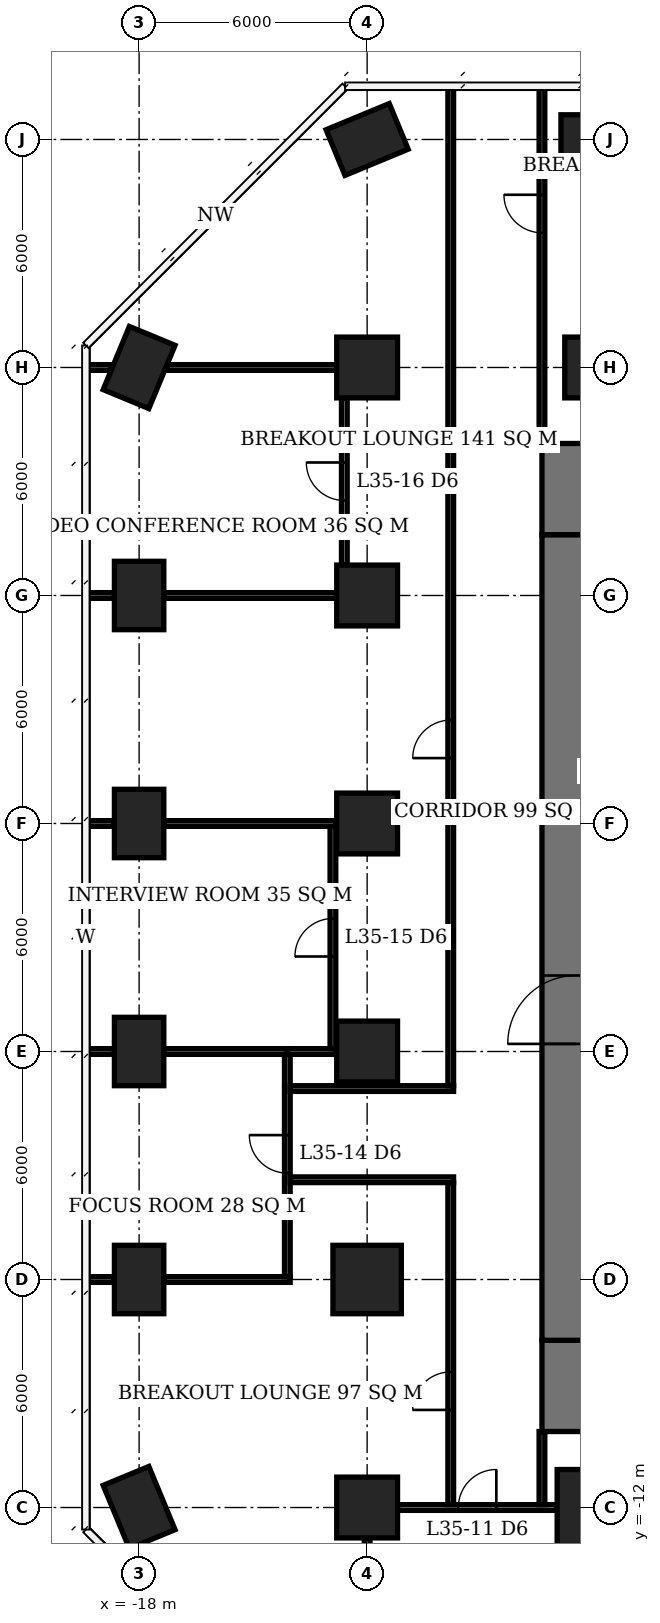
"""IFC4 building model, lengths in metres.
Left out: names, types, materials, properties, quantities, classifications, styles, units other than length and angle.
Written with IfcOpenShell. Run it as: python <this file> out.ifc"""

import sys

from ifc_helpers import new_model, si_unit, direction, frame, frame_2d, origin, origin_2d, place, context, subcontext, project, spatial, rectangle, extrude, element, fill, save


model = new_model("IFC4")
c1 = context("Model", 3, precision=1e-05, world=origin(), true_north=direction((0.0, 1.0)))
c2 = subcontext(c1, "Body", "Model", "MODEL_VIEW")
j1 = project(units=[si_unit("LENGTHUNIT", "METRE"), si_unit("PLANEANGLEUNIT", "RADIAN")], contexts=[c1])
p1 = place(None, origin())
s1 = spatial("IfcSite", under=j1, at=p1, CompositionType="ELEMENT")
p2 = place(p1, origin())
s2 = spatial("IfcBuilding", under=s1, at=p2, CompositionType="ELEMENT")
p3 = place(p2, frame((0.0, 0.0, 144.5)))
s3 = spatial("IfcBuildingStorey", under=s2, at=p3, CompositionType="ELEMENT", Elevation=144.5)
for number, where, z_axis, x_axis in (
    (1, (-18.0, -12.0, 0.0), (0.0, 0.0, 1.0), (-0.383, 0.924, 0.0)),
    (2, (-18.0, -6.0, 0.0), (0.0, 0.0, 1.0), (0.0, 1.0, 0.0)),
    (3, (-18.0, 0.0, 0.0), (0.0, 0.0, 1.0), (0.0, 1.0, 0.0)),
    (4, (-18.0, 6.0, 0.0), (0.0, 0.0, 1.0), (0.0, 1.0, 0.0)),
    (5, (-18.0, 12.0, 0.0), (0.0, 0.0, 1.0), (0.0, 1.0, 0.0)),
    (6, (-18.0, 18.0, 0.0), (0.0, 0.0, 1.0), (0.383, 0.924, 0.0)),
):
    element("IfcColumn", number, at=place(p3, frame(where, z_axis=z_axis, x_axis=x_axis)), inside=s3, PredefinedType="COLUMN", context=c2, shape_type="SweptSolid", body=[
        extrude(rectangle(XDim=1.8, YDim=1.3, at=origin_2d()), origin(), (0.0, 0.0, 1.0), 3.9),
    ])
p4 = place(p3, frame((-12.0, -12.0, 0.0), z_axis=(0.0, 0.0, 1.0), x_axis=(1.0, 0.0, 0.0)))
e7 = element("IfcColumn", 7, at=p4, inside=s3, PredefinedType="COLUMN", context=c2, shape_type="SweptSolid", body=[
    extrude(rectangle(XDim=1.6, YDim=1.6, at=origin_2d()), origin(), (0.0, 0.0, 1.0), 3.9),
])
p5 = place(p3, frame((-12.0, -6.0, 0.0), z_axis=(0.0, 0.0, 1.0), x_axis=(1.0, 0.0, 0.0)))
e8 = element("IfcColumn", 8, at=p5, inside=s3, PredefinedType="COLUMN", context=c2, shape_type="SweptSolid", body=[
    extrude(rectangle(XDim=1.8, YDim=1.8, at=origin_2d()), origin(), (0.0, 0.0, 1.0), 3.9),
])
for number, where, z_axis, x_axis in (
    (9, (-12.0, 0.0, 0.0), (0.0, 0.0, 1.0), (1.0, 0.0, 0.0)),
    (10, (-12.0, 6.0, 0.0), (0.0, 0.0, 1.0), (1.0, 0.0, 0.0)),
    (11, (-12.0, 12.0, 0.0), (0.0, 0.0, 1.0), (1.0, 0.0, 0.0)),
    (12, (-12.0, 18.0, 0.0), (0.0, 0.0, 1.0), (1.0, 0.0, 0.0)),
):
    element("IfcColumn", number, at=place(p3, frame(where, z_axis=z_axis, x_axis=x_axis)), inside=s3, PredefinedType="COLUMN", context=c2, shape_type="SweptSolid", body=[
        extrude(rectangle(XDim=1.6, YDim=1.6, at=origin_2d()), origin(), (0.0, 0.0, 1.0), 3.9),
    ])
p6 = place(p3, frame((-12.0, 24.0, 0.0), z_axis=(0.0, 0.0, 1.0), x_axis=(0.923879532511, 0.382683432365, 0.0)))
e13 = element("IfcColumn", 13, at=p6, inside=s3, PredefinedType="COLUMN", context=c2, shape_type="SweptSolid", body=[
    extrude(rectangle(XDim=1.8, YDim=1.3, at=origin_2d()), origin(), (0.0, 0.0, 1.0), 3.9),
])
p7 = place(p3, frame((-6.0, -12.0, 0.0), z_axis=(0.0, 0.0, 1.0), x_axis=(1.0, 0.0, 0.0)))
e14 = element("IfcColumn", 14, at=p7, inside=s3, PredefinedType="COLUMN", context=c2, shape_type="SweptSolid", body=[
    extrude(rectangle(XDim=2.0, YDim=2.0, at=origin_2d()), origin(), (0.0, 0.0, 1.0), 3.9),
])
p8 = place(p3, frame((-6.0, 18.0, 0.0), z_axis=(0.0, 0.0, 1.0), x_axis=(1.0, 0.0, 0.0)))
e15 = element("IfcColumn", 15, at=p8, inside=s3, PredefinedType="COLUMN", context=c2, shape_type="SweptSolid", body=[
    extrude(rectangle(XDim=1.6, YDim=1.6, at=origin_2d()), origin(), (0.0, 0.0, 1.0), 3.9),
])
p9 = place(p3, frame((-6.0, 24.0, 0.0), z_axis=(0.0, 0.0, 1.0), x_axis=(1.0, 0.0, 0.0)))
e16 = element("IfcColumn", 16, at=p9, inside=s3, PredefinedType="COLUMN", context=c2, shape_type="SweptSolid", body=[
    extrude(rectangle(XDim=1.8, YDim=1.3, at=origin_2d()), origin(), (0.0, 0.0, 1.0), 3.9),
])
p10 = place(p3, frame((-6.5, -7.6, 0.0), z_axis=(0.0, 0.0, 1.0), x_axis=(0.0, 1.0, 0.0)))
e17 = element("IfcWall", 17, at=p10, inside=s3, PredefinedType="SHEAR", context=c2, shape_type="SweptSolid", body=[
    extrude(rectangle(XDim=21.2, YDim=1.8, at=frame_2d((10.6, 0.0))), origin(), (0.0, 0.0, 1.0), 3.9),
])
p11 = place(p10, frame((7.8, 0.0, 0.0)))
e18 = element("IfcOpeningElement", 18, at=p11, cuts=e17, PredefinedType="OPENING", context=c2, shape_type="SweptSolid", body=[
    extrude(rectangle(XDim=1.8, YDim=2.4, at=frame_2d((0.9, 1.2))), frame((0.0, 0.91, 0.0), z_axis=(0.0, -1.0, 0.0), x_axis=(1.0, 0.0, 0.0)), (0.0, 0.0, 1.0), 1.82),
])
for number, where, z_axis, x_axis in (
    (19, (-6.5, -10.0, 0.0), (0.0, 0.0, 1.0), (0.0, 1.0, 0.0)),
    (20, (-6.5, 13.6, 0.0), (0.0, 0.0, 1.0), (0.0, 1.0, 0.0)),
):
    element("IfcWall", number, at=place(p3, frame(where, z_axis=z_axis, x_axis=x_axis)), inside=s3, PredefinedType="SHEAR", context=c2, shape_type="SweptSolid", body=[
        extrude(rectangle(XDim=2.4, YDim=1.8, at=frame_2d((1.2, 0.0))), origin(), (0.0, 0.0, 1.0), 3.9),
    ])
p12 = place(p3, frame((-11.2, -12.0, 0.0), z_axis=(0.0, 0.0, 1.0), x_axis=(1.0, 0.0, 0.0)))
e21 = element("IfcWall", 21, at=p12, inside=s3, PredefinedType="PARTITIONING", context=c2, shape_type="SweptSolid", body=[
    extrude(rectangle(XDim=4.2, YDim=0.15, at=frame_2d((2.1, 0.0))), origin(), (0.0, 0.0, 1.0), 3.65),
])
p13 = place(p12, frame((1.6, 0.0, 0.0)))
e22 = element("IfcOpeningElement", 22, at=p13, cuts=e21, PredefinedType="OPENING", context=c2, shape_type="SweptSolid", body=[
    extrude(rectangle(XDim=1.0, YDim=2.1, at=frame_2d((0.5, 1.05))), frame((0.0, 0.085, 0.0), z_axis=(0.0, -1.0, 0.0), x_axis=(1.0, 0.0, 0.0)), (0.0, 0.0, 1.0), 0.17),
])
p14 = place(p3, frame((-19.4, -6.0, 0.0), z_axis=(0.0, 0.0, 1.0), x_axis=(1.0, 0.0, 0.0)))
e23 = element("IfcWall", 23, at=p14, inside=s3, PredefinedType="PARTITIONING", context=c2, shape_type="SweptSolid", body=[
    extrude(rectangle(XDim=0.75, YDim=0.15, at=frame_2d((0.375, 0.0))), origin(), (0.0, 0.0, 1.0), 3.65),
])
p15 = place(p3, frame((-17.35, -6.0, 0.0), z_axis=(0.0, 0.0, 1.0), x_axis=(1.0, 0.0, 0.0)))
e24 = element("IfcWall", 24, at=p15, inside=s3, PredefinedType="PARTITIONING", context=c2, shape_type="SweptSolid", body=[
    extrude(rectangle(XDim=3.325, YDim=0.15, at=frame_2d((1.663, 0.0))), origin(), (0.0, 0.0, 1.0), 3.65),
])
p16 = place(p3, frame((-19.35, 0.0, 0.0), z_axis=(0.0, 0.0, 1.0), x_axis=(1.0, 0.0, 0.0)))
e25 = element("IfcWall", 25, at=p16, inside=s3, PredefinedType="PARTITIONING", context=c2, shape_type="SweptSolid", body=[
    extrude(rectangle(XDim=0.7, YDim=0.15, at=frame_2d((0.35, 0.0))), origin(), (0.0, 0.0, 1.0), 3.65),
])
p17 = place(p3, frame((-17.35, 0.0, 0.0), z_axis=(0.0, 0.0, 1.0), x_axis=(1.0, 0.0, 0.0)))
e26 = element("IfcWall", 26, at=p17, inside=s3, PredefinedType="PARTITIONING", context=c2, shape_type="SweptSolid", body=[
    extrude(rectangle(XDim=3.325, YDim=0.15, at=frame_2d((1.663, 0.0))), origin(), (0.0, 0.0, 1.0), 3.65),
])
p18 = place(p3, frame((-14.1, 0.0, 0.0), z_axis=(0.0, 0.0, 1.0), x_axis=(1.0, 0.0, 0.0)))
e27 = element("IfcWall", 27, at=p18, inside=s3, PredefinedType="PARTITIONING", context=c2, shape_type="SweptSolid", body=[
    extrude(rectangle(XDim=1.275, YDim=0.15, at=frame_2d((0.638, 0.0))), origin(), (0.0, 0.0, 1.0), 3.65),
])
p19 = place(p3, frame((-19.35, 6.0, 0.0), z_axis=(0.0, 0.0, 1.0), x_axis=(1.0, 0.0, 0.0)))
e28 = element("IfcWall", 28, at=p19, inside=s3, PredefinedType="PARTITIONING", context=c2, shape_type="SweptSolid", body=[
    extrude(rectangle(XDim=0.7, YDim=0.15, at=frame_2d((0.35, 0.0))), origin(), (0.0, 0.0, 1.0), 3.65),
])
p20 = place(p3, frame((-17.35, 6.0, 0.0), z_axis=(0.0, 0.0, 1.0), x_axis=(1.0, 0.0, 0.0)))
e29 = element("IfcWall", 29, at=p20, inside=s3, PredefinedType="PARTITIONING", context=c2, shape_type="SweptSolid", body=[
    extrude(rectangle(XDim=4.525, YDim=0.15, at=frame_2d((2.263, 0.0))), origin(), (0.0, 0.0, 1.0), 3.65),
])
p21 = place(p3, frame((-19.4, 12.0, 0.0), z_axis=(0.0, 0.0, 1.0), x_axis=(1.0, 0.0, 0.0)))
e30 = element("IfcWall", 30, at=p21, inside=s3, PredefinedType="PARTITIONING", context=c2, shape_type="SweptSolid", body=[
    extrude(rectangle(XDim=0.75, YDim=0.15, at=frame_2d((0.375, 0.0))), origin(), (0.0, 0.0, 1.0), 3.65),
])
p22 = place(p3, frame((-17.35, 12.0, 0.0), z_axis=(0.0, 0.0, 1.0), x_axis=(1.0, 0.0, 0.0)))
e31 = element("IfcWall", 31, at=p22, inside=s3, PredefinedType="PARTITIONING", context=c2, shape_type="SweptSolid", body=[
    extrude(rectangle(XDim=4.55, YDim=0.15, at=frame_2d((2.275, 0.0))), origin(), (0.0, 0.0, 1.0), 3.65),
])
p23 = place(p3, frame((-19.4, 18.0, 0.0), z_axis=(0.0, 0.0, 1.0), x_axis=(1.0, 0.0, 0.0)))
e32 = element("IfcWall", 32, at=p23, inside=s3, PredefinedType="PARTITIONING", context=c2, shape_type="SweptSolid", body=[
    extrude(rectangle(XDim=0.665, YDim=0.15, at=frame_2d((0.333, 0.0))), origin(), (0.0, 0.0, 1.0), 3.65),
])
p24 = place(p3, frame((-17.265, 18.0, 0.0), z_axis=(0.0, 0.0, 1.0), x_axis=(1.0, 0.0, 0.0)))
e33 = element("IfcWall", 33, at=p24, inside=s3, PredefinedType="PARTITIONING", context=c2, shape_type="SweptSolid", body=[
    extrude(rectangle(XDim=4.465, YDim=0.15, at=frame_2d((2.233, 0.0))), origin(), (0.0, 0.0, 1.0), 3.65),
])
p25 = place(p3, frame((-14.1, -5.925, 0.0), z_axis=(0.0, 0.0, 1.0), x_axis=(0.0, 1.0, 0.0)))
e34 = element("IfcWall", 34, at=p25, inside=s3, PredefinedType="PARTITIONING", context=c2, shape_type="SweptSolid", body=[
    extrude(rectangle(XDim=5.85, YDim=0.15, at=frame_2d((2.925, 0.0))), origin(), (0.0, 0.0, 1.0), 3.65),
])
p26 = place(p25, frame((2.725, 0.0, 0.0)))
e35 = element("IfcOpeningElement", 35, at=p26, cuts=e34, PredefinedType="OPENING", context=c2, shape_type="SweptSolid", body=[
    extrude(rectangle(XDim=1.0, YDim=2.1, at=frame_2d((0.5, 1.05))), frame((0.0, 0.085, 0.0), z_axis=(0.0, -1.0, 0.0), x_axis=(1.0, 0.0, 0.0)), (0.0, 0.0, 1.0), 0.17),
])
p27 = place(p3, frame((-12.9, 0.075, 0.0), z_axis=(0.0, 0.0, 1.0), x_axis=(0.0, 1.0, 0.0)))
e36 = element("IfcWall", 36, at=p27, inside=s3, PredefinedType="PARTITIONING", context=c2, shape_type="SweptSolid", body=[
    extrude(rectangle(XDim=5.85, YDim=0.15, at=frame_2d((2.925, 0.0))), origin(), (0.0, 0.0, 1.0), 3.65),
])
p28 = place(p27, frame((2.425, 0.0, 0.0)))
e37 = element("IfcOpeningElement", 37, at=p28, cuts=e36, PredefinedType="OPENING", context=c2, shape_type="SweptSolid", body=[
    extrude(rectangle(XDim=1.0, YDim=2.1, at=frame_2d((0.5, 1.05))), frame((0.0, 0.085, 0.0), z_axis=(0.0, -1.0, 0.0), x_axis=(1.0, 0.0, 0.0)), (0.0, 0.0, 1.0), 0.17),
])
p29 = place(p3, frame((-12.6, 12.8, 0.0), z_axis=(0.0, 0.0, 1.0), x_axis=(0.0, 1.0, 0.0)))
e38 = element("IfcWall", 38, at=p29, inside=s3, PredefinedType="PARTITIONING", context=c2, shape_type="SweptSolid", body=[
    extrude(rectangle(XDim=4.4, YDim=0.15, at=frame_2d((2.2, 0.0))), origin(), (0.0, 0.0, 1.0), 3.65),
])
p30 = place(p29, frame((1.7, 0.0, 0.0)))
e39 = element("IfcOpeningElement", 39, at=p30, cuts=e38, PredefinedType="OPENING", context=c2, shape_type="SweptSolid", body=[
    extrude(rectangle(XDim=1.0, YDim=2.1, at=frame_2d((0.5, 1.05))), frame((0.0, 0.085, 0.0), z_axis=(0.0, -1.0, 0.0), x_axis=(1.0, 0.0, 0.0)), (0.0, 0.0, 1.0), 0.17),
])
p31 = place(p3, frame((-12.0, -16.31, 0.0), z_axis=(0.0, 0.0, 1.0), x_axis=(0.0, 1.0, 0.0)))
e40 = element("IfcWall", 40, at=p31, inside=s3, PredefinedType="PARTITIONING", context=c2, shape_type="SweptSolid", body=[
    extrude(rectangle(XDim=3.51, YDim=0.15, at=frame_2d((1.755, 0.0))), origin(), (0.0, 0.0, 1.0), 2.65),
])
for number, where, z_axis, x_axis in (
    (41, (-14.025, -3.375, 0.0), (0.0, 0.0, 1.0), (1.0, 0.0, 0.0)),
    (42, (-14.025, -0.975, 0.0), (0.0, 0.0, 1.0), (1.0, 0.0, 0.0)),
):
    element("IfcWall", number, at=place(p3, frame(where, z_axis=z_axis, x_axis=x_axis)), inside=s3, PredefinedType="PARTITIONING", context=c2, shape_type="SweptSolid", body=[
        extrude(rectangle(XDim=4.3, YDim=0.15, at=frame_2d((2.15, 0.0))), origin(), (0.0, 0.0, 1.0), 3.65),
    ])
p32 = place(p3, frame((-9.8, -11.925, 0.0), z_axis=(0.0, 0.0, 1.0), x_axis=(0.0, 1.0, 0.0)))
e43 = element("IfcWall", 43, at=p32, inside=s3, PredefinedType="PARTITIONING", context=c2, shape_type="SweptSolid", body=[
    extrude(rectangle(XDim=8.475, YDim=0.15, at=frame_2d((4.238, 0.0))), origin(), (0.0, 0.0, 1.0), 3.65),
])
p33 = place(p32, frame((2.493, 0.0, 0.0)))
e44 = element("IfcOpeningElement", 44, at=p33, cuts=e43, PredefinedType="OPENING", context=c2, shape_type="SweptSolid", body=[
    extrude(rectangle(XDim=1.0, YDim=2.1, at=frame_2d((0.5, 1.05))), frame((0.0, 0.085, 0.0), z_axis=(0.0, -1.0, 0.0), x_axis=(1.0, 0.0, 0.0)), (0.0, 0.0, 1.0), 0.17),
])
p34 = place(p3, frame((-9.8, -0.9, 0.0), z_axis=(0.0, 0.0, 1.0), x_axis=(0.0, 1.0, 0.0)))
e45 = element("IfcWall", 45, at=p34, inside=s3, PredefinedType="PARTITIONING", context=c2, shape_type="SweptSolid", body=[
    extrude(rectangle(XDim=26.3, YDim=0.15, at=frame_2d((13.15, 0.0))), origin(), (0.0, 0.0, 1.0), 3.65),
])
p35 = place(p34, frame((8.621, 0.0, 0.0)))
e46 = element("IfcOpeningElement", 46, at=p35, cuts=e45, PredefinedType="OPENING", context=c2, shape_type="SweptSolid", body=[
    extrude(rectangle(XDim=1.0, YDim=2.1, at=frame_2d((0.5, 1.05))), frame((0.0, 0.085, 0.0), z_axis=(0.0, -1.0, 0.0), x_axis=(1.0, 0.0, 0.0)), (0.0, 0.0, 1.0), 0.17),
])
p36 = place(p3, frame((-7.4, -11.925, 0.0), z_axis=(0.0, 0.0, 1.0), x_axis=(0.0, 1.0, 0.0)))
e47 = element("IfcWall", 47, at=p36, inside=s3, PredefinedType="PARTITIONING", context=c2, shape_type="SweptSolid", body=[
    extrude(rectangle(XDim=1.925, YDim=0.15, at=frame_2d((0.962, 0.0))), origin(), (0.0, 0.0, 1.0), 3.65),
])
p37 = place(p3, frame((-7.4, 16.0, 0.0), z_axis=(0.0, 0.0, 1.0), x_axis=(0.0, 1.0, 0.0)))
e48 = element("IfcWall", 48, at=p37, inside=s3, PredefinedType="PARTITIONING", context=c2, shape_type="SweptSolid", body=[
    extrude(rectangle(XDim=9.4, YDim=0.15, at=frame_2d((4.7, 0.0))), origin(), (0.0, 0.0, 1.0), 3.65),
])
p38 = place(p37, frame((5.545, 0.0, 0.0)))
e49 = element("IfcOpeningElement", 49, at=p38, cuts=e48, PredefinedType="OPENING", context=c2, shape_type="SweptSolid", body=[
    extrude(rectangle(XDim=1.0, YDim=2.1, at=frame_2d((0.5, 1.05))), frame((0.0, 0.085, 0.0), z_axis=(0.0, -1.0, 0.0), x_axis=(1.0, 0.0, 0.0)), (0.0, 0.0, 1.0), 0.17),
])
p39 = place(p11, origin())
e50 = element("IfcDoor", 50, at=p39, inside=s3, OperationType="DOUBLE_DOOR_SINGLE_SWING", PredefinedType="DOOR", context=c2, shape_type="SweptSolid", body=[
    extrude(rectangle(XDim=1.8, YDim=2.4, at=frame_2d((0.9, 1.2))), frame((0.0, 0.025, 0.0), z_axis=(0.0, -1.0, 0.0), x_axis=(1.0, 0.0, 0.0)), (0.0, 0.0, 1.0), 0.05),
])
fill(e18, e50)
p40 = place(p13, origin())
e51 = element("IfcDoor", 51, at=p40, inside=s3, OperationType="SINGLE_SWING_RIGHT", PredefinedType="DOOR", context=c2, shape_type="SweptSolid", body=[
    extrude(rectangle(XDim=1.0, YDim=2.1, at=frame_2d((0.5, 1.05))), frame((0.0, 0.025, 0.0), z_axis=(0.0, -1.0, 0.0), x_axis=(1.0, 0.0, 0.0)), (0.0, 0.0, 1.0), 0.05),
])
fill(e22, e51)
p41 = place(p26, origin())
e52 = element("IfcDoor", 52, at=p41, inside=s3, OperationType="SINGLE_SWING_RIGHT", PredefinedType="DOOR", context=c2, shape_type="SweptSolid", body=[
    extrude(rectangle(XDim=1.0, YDim=2.1, at=frame_2d((0.5, 1.05))), frame((0.0, 0.025, 0.0), z_axis=(0.0, -1.0, 0.0), x_axis=(1.0, 0.0, 0.0)), (0.0, 0.0, 1.0), 0.05),
])
fill(e35, e52)
p42 = place(p28, origin())
e53 = element("IfcDoor", 53, at=p42, inside=s3, OperationType="SINGLE_SWING_LEFT", PredefinedType="DOOR", context=c2, shape_type="SweptSolid", body=[
    extrude(rectangle(XDim=1.0, YDim=2.1, at=frame_2d((0.5, 1.05))), frame((0.0, 0.025, 0.0), z_axis=(0.0, -1.0, 0.0), x_axis=(1.0, 0.0, 0.0)), (0.0, 0.0, 1.0), 0.05),
])
fill(e37, e53)
p43 = place(p30, origin())
e54 = element("IfcDoor", 54, at=p43, inside=s3, OperationType="SINGLE_SWING_RIGHT", PredefinedType="DOOR", context=c2, shape_type="SweptSolid", body=[
    extrude(rectangle(XDim=1.0, YDim=2.1, at=frame_2d((0.5, 1.05))), frame((0.0, 0.025, 0.0), z_axis=(0.0, -1.0, 0.0), x_axis=(1.0, 0.0, 0.0)), (0.0, 0.0, 1.0), 0.05),
])
fill(e39, e54)
p44 = place(p33, origin())
e55 = element("IfcDoor", 55, at=p44, inside=s3, OperationType="SINGLE_SWING_LEFT", PredefinedType="DOOR", context=c2, shape_type="SweptSolid", body=[
    extrude(rectangle(XDim=1.0, YDim=2.1, at=frame_2d((0.5, 1.05))), frame((0.0, 0.025, 0.0), z_axis=(0.0, -1.0, 0.0), x_axis=(1.0, 0.0, 0.0)), (0.0, 0.0, 1.0), 0.05),
])
fill(e44, e55)
p45 = place(p35, origin())
e56 = element("IfcDoor", 56, at=p45, inside=s3, OperationType="SINGLE_SWING_LEFT", PredefinedType="DOOR", context=c2, shape_type="SweptSolid", body=[
    extrude(rectangle(XDim=1.0, YDim=2.1, at=frame_2d((0.5, 1.05))), frame((0.0, 0.025, 0.0), z_axis=(0.0, -1.0, 0.0), x_axis=(1.0, 0.0, 0.0)), (0.0, 0.0, 1.0), 0.05),
])
fill(e46, e56)
p46 = place(p38, origin())
e57 = element("IfcDoor", 57, at=p46, inside=s3, OperationType="SINGLE_SWING_RIGHT", PredefinedType="DOOR", context=c2, shape_type="SweptSolid", body=[
    extrude(rectangle(XDim=1.0, YDim=2.1, at=frame_2d((0.5, 1.05))), frame((0.0, 0.025, 0.0), z_axis=(0.0, -1.0, 0.0), x_axis=(1.0, 0.0, 0.0)), (0.0, 0.0, 1.0), 0.05),
])
fill(e49, e57)
save(model, sys.argv[1])
